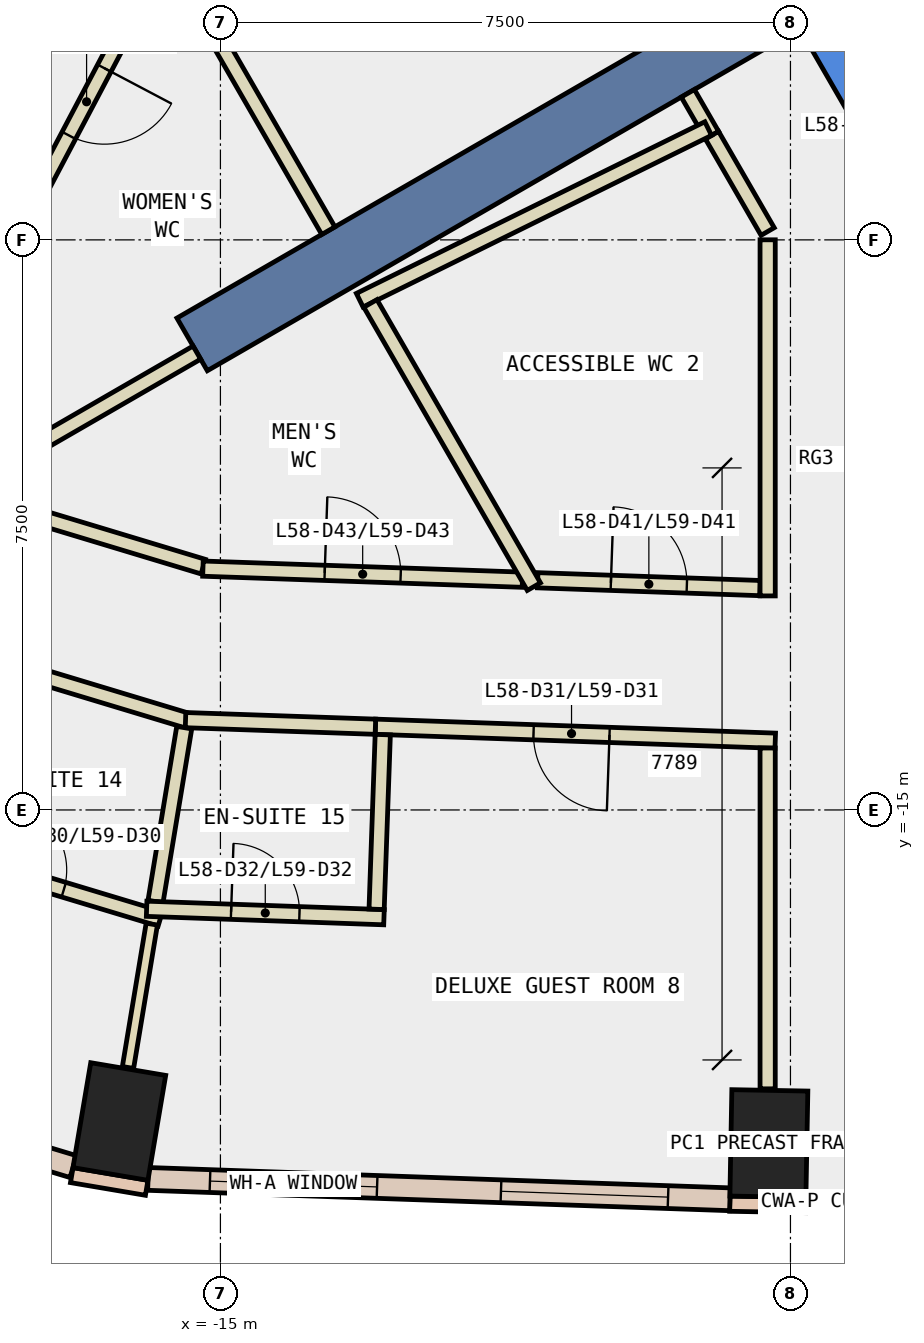
"""IFC4 building model, lengths in metres.
Left out: names, types, materials, properties, quantities, classifications, styles, units other than length and angle.
Written with IfcOpenShell. Run it as: python <this file> out.ifc"""

import sys

from ifc_helpers import new_model, si_unit, direction, frame, frame_2d, origin, origin_2d, place, context, subcontext, project, spatial, polyline, rectangle, outline, extrude, element, fill, save


model = new_model("IFC4")
c1 = context("Model", 3, precision=1e-05, world=origin(), true_north=direction((0.0, 1.0)))
c2 = subcontext(c1, "Body", "Model", "MODEL_VIEW")
j1 = project(units=[si_unit("LENGTHUNIT", "METRE"), si_unit("PLANEANGLEUNIT", "RADIAN")], contexts=[c1])
p1 = place(None, origin())
s1 = spatial("IfcSite", under=j1, at=p1, CompositionType="ELEMENT")
p2 = place(p1, origin())
s2 = spatial("IfcBuilding", under=s1, at=p2, CompositionType="ELEMENT")
p3 = place(p2, frame((0.0, 0.0, 255.8)))
s3 = spatial("IfcBuildingStorey", under=s2, at=p3, CompositionType="ELEMENT", Elevation=255.8)
for number, where, z_axis, x_axis in (
    (1, (-16.33, -19.099, -0.34), (0.0, 0.0, 1.0), (-0.986, 0.167, 0.0)),
    (2, (-7.784, -19.389, -0.34), (0.0, 0.0, 1.0), (-1.0, 0.018, 0.0)),
):
    element("IfcColumn", number, at=place(p3, frame(where, z_axis=z_axis, x_axis=x_axis)), inside=s3, PredefinedType="COLUMN", context=c2, shape_type="SweptSolid", body=[
        extrude(rectangle(XDim=1.0, YDim=1.4, at=origin_2d()), origin(), (0.0, 0.0, 1.0), 3.6),
    ])
p4 = place(p3, frame((0.0, 0.0, -0.34)))
e3 = element("IfcWall", 3, at=p4, inside=s3, PredefinedType="SHEAR", context=c2, shape_type="SweptSolid", body=[
    extrude(outline(polyline([(-11.547, 2.5), (-5.774, -7.5), (-5.427, -6.9), (-10.854, 2.5), (-11.547, 2.5)])), origin(), (0.0, 0.0, 1.0), 3.6),
])
p5 = place(p3, frame((-7.578, -4.375, -0.34), z_axis=(0.0, 0.0, 1.0), x_axis=(-0.866024315419, -0.5000018851, 0.0)))
e4 = element("IfcWall", 4, at=p5, inside=s3, PredefinedType="SHEAR", context=c2, shape_type="SweptSolid", body=[
    extrude(rectangle(XDim=9.0, YDim=0.8, at=frame_2d((4.5, 0.0))), origin(), (0.0, 0.0, 1.0), 3.6),
])
for number, where, z_axis, x_axis in (
    (5, (-16.956, -19.804, 0.0), (0.0, 0.0, 1.0), (0.986, -0.167, 0.0)),
    (6, (-8.298, -20.18, 0.0), (0.0, 0.0, 1.0), (1.0, -0.018, 0.0)),
):
    element("IfcWall", number, at=place(p3, frame(where, z_axis=z_axis, x_axis=x_axis)), inside=s3, PredefinedType="STANDARD", context=c2, shape_type="SweptSolid", body=[
        extrude(rectangle(XDim=1.0, YDim=0.2, at=frame_2d((0.5, 0.0))), origin(), (0.0, 0.0, 1.0), 3.26),
    ])
p6 = place(p3, frame((-15.952, -19.854, 0.0), z_axis=(0.0, 0.0, 1.0), x_axis=(0.999387577449, -0.034992428331, 0.0)))
e7 = element("IfcWall", 7, at=p6, inside=s3, PredefinedType="STANDARD", context=c2, shape_type="SweptSolid", body=[
    extrude(rectangle(XDim=7.661, YDim=0.3, at=frame_2d((3.83, 0.0))), origin(), (0.0, 0.0, 1.0), 3.26),
])
p7 = place(p6, frame((0.815, 0.0, 0.9)))
e8 = element("IfcOpeningElement", 8, at=p7, cuts=e7, PredefinedType="OPENING", context=c2, shape_type="SweptSolid", body=[
    extrude(rectangle(XDim=2.2, YDim=2.0, at=frame_2d((1.1, 1.0))), frame((0.0, 0.16, 0.0), z_axis=(0.0, -1.0, 0.0), x_axis=(1.0, 0.0, 0.0)), (0.0, 0.0, 1.0), 0.32),
])
p8 = place(p6, frame((4.646, 0.0, 0.9)))
e9 = element("IfcOpeningElement", 9, at=p8, cuts=e7, PredefinedType="OPENING", context=c2, shape_type="SweptSolid", body=[
    extrude(rectangle(XDim=2.2, YDim=2.0, at=frame_2d((1.1, 1.0))), frame((0.0, 0.16, 0.0), z_axis=(0.0, -1.0, 0.0), x_axis=(1.0, 0.0, 0.0)), (0.0, 0.0, 1.0), 0.32),
])
p9 = place(p3, frame((-21.034, -18.455, 0.0), z_axis=(0.0, 0.0, 1.0), x_axis=(0.957346168713, -0.288943442997, 0.0)))
e10 = element("IfcWall", 10, at=p9, inside=s3, PredefinedType="STANDARD", context=c2, shape_type="SweptSolid", body=[
    extrude(rectangle(XDim=4.281, YDim=0.3, at=frame_2d((2.14, 0.0))), origin(), (0.0, 0.0, 1.0), 3.26),
])
p10 = place(p9, frame((1.44, 0.0, 0.9)))
e11 = element("IfcOpeningElement", 11, at=p10, cuts=e10, PredefinedType="OPENING", context=c2, shape_type="SweptSolid", body=[
    extrude(rectangle(XDim=1.4, YDim=2.0, at=frame_2d((0.7, 1.0))), frame((0.0, 0.16, 0.0), z_axis=(0.0, -1.0, 0.0), x_axis=(1.0, 0.0, 0.0)), (0.0, 0.0, 1.0), 0.32),
])
p11 = place(p3, frame((-8.532, -6.123, 0.0), z_axis=(0.0, 0.0, 1.0), x_axis=(-0.499977104415, 0.866038622153, 0.0)))
e12 = element("IfcWall", 12, at=p11, inside=s3, PredefinedType="PARTITIONING", context=c2, shape_type="SweptSolid", body=[
    extrude(rectangle(XDim=0.636, YDim=0.2, at=frame_2d((0.318, 0.0))), origin(), (0.0, 0.0, 1.0), 3.26),
])
p12 = place(p3, frame((-7.8, -7.39, 0.0), z_axis=(0.0, 0.0, 1.0), x_axis=(-0.500266477503, 0.865871498253, 0.0)))
e13 = element("IfcWall", 13, at=p12, inside=s3, PredefinedType="PARTITIONING", context=c2, shape_type="SweptSolid", body=[
    extrude(rectangle(XDim=1.463, YDim=0.2, at=frame_2d((0.731, 0.0))), origin(), (0.0, 0.0, 1.0), 3.26),
])
p13 = place(p3, frame((-10.826, -11.978, 0.0), z_axis=(0.0, 0.0, 1.0), x_axis=(0.999380679818, -0.035188873332, 0.0)))
e14 = element("IfcWall", 14, at=p13, inside=s3, PredefinedType="PARTITIONING", context=c2, shape_type="SweptSolid", body=[
    extrude(rectangle(XDim=2.928, YDim=0.2, at=frame_2d((1.464, 0.0))), origin(), (0.0, 0.0, 1.0), 3.26),
])
p14 = place(p13, frame((0.964, 0.0, 0.0)))
e15 = element("IfcOpeningElement", 15, at=p14, cuts=e14, PredefinedType="OPENING", context=c2, shape_type="SweptSolid", body=[
    extrude(rectangle(XDim=1.0, YDim=2.1, at=frame_2d((0.5, 1.05))), frame((0.0, 0.11, 0.0), z_axis=(0.0, -1.0, 0.0), x_axis=(1.0, 0.0, 0.0)), (0.0, 0.0, 1.0), 0.22),
])
p15 = place(p3, frame((-15.756, -3.779, 0.0), z_axis=(0.0, 0.0, 1.0), x_axis=(-0.46672043873, -0.884404902786, 0.0)))
e16 = element("IfcWall", 16, at=p15, inside=s3, PredefinedType="PARTITIONING", context=c2, shape_type="SweptSolid", body=[
    extrude(rectangle(XDim=4.307, YDim=0.2, at=frame_2d((2.153, 0.0))), origin(), (0.0, 0.0, 1.0), 3.26),
])
p16 = place(p15, frame((1.653, 0.0, 0.0)))
e17 = element("IfcOpeningElement", 17, at=p16, cuts=e16, PredefinedType="OPENING", context=c2, shape_type="SweptSolid", body=[
    extrude(rectangle(XDim=1.0, YDim=2.1, at=frame_2d((0.5, 1.05))), frame((0.0, 0.11, 0.0), z_axis=(0.0, -1.0, 0.0), x_axis=(1.0, 0.0, 0.0)), (0.0, 0.0, 1.0), 0.22),
])
p17 = place(p3, frame((-17.386, -11.147, 0.0), z_axis=(0.0, 0.0, 1.0), x_axis=(0.957321496956, -0.289025174451, 0.0)))
e18 = element("IfcWall", 18, at=p17, inside=s3, PredefinedType="PARTITIONING", context=c2, shape_type="SweptSolid", body=[
    extrude(rectangle(XDim=2.256, YDim=0.2, at=frame_2d((1.128, 0.0))), origin(), (0.0, 0.0, 1.0), 3.26),
])
p18 = place(p3, frame((-15.23, -11.825, 0.0), z_axis=(0.0, 0.0, 1.0), x_axis=(0.999397560436, -0.0347061406, 0.0)))
e19 = element("IfcWall", 19, at=p18, inside=s3, PredefinedType="PARTITIONING", context=c2, shape_type="SweptSolid", body=[
    extrude(rectangle(XDim=4.207, YDim=0.2, at=frame_2d((2.103, 0.0))), origin(), (0.0, 0.0, 1.0), 3.26),
])
p19 = place(p18, frame((1.603, 0.0, 0.0)))
e20 = element("IfcOpeningElement", 20, at=p19, cuts=e19, PredefinedType="OPENING", context=c2, shape_type="SweptSolid", body=[
    extrude(rectangle(XDim=1.0, YDim=2.1, at=frame_2d((0.5, 1.05))), frame((0.0, 0.11, 0.0), z_axis=(0.0, -1.0, 0.0), x_axis=(1.0, 0.0, 0.0)), (0.0, 0.0, 1.0), 0.22),
])
p20 = place(p3, frame((-15.363, -13.847, 0.0), z_axis=(0.0, 0.0, 1.0), x_axis=(-0.957320969561, 0.289026921303, 0.0)))
e21 = element("IfcWall", 21, at=p20, inside=s3, PredefinedType="PARTITIONING", context=c2, shape_type="SweptSolid", body=[
    extrude(rectangle(XDim=3.214, YDim=0.2, at=frame_2d((1.607, 0.0))), origin(), (0.0, 0.0, 1.0), 3.26),
])
p21 = place(p3, frame((-7.7, -14.089, 0.0), z_axis=(0.0, 0.0, 1.0), x_axis=(-0.999388410674, 0.034968623214, 0.0)))
e22 = element("IfcWall", 22, at=p21, inside=s3, PredefinedType="PARTITIONING", context=c2, shape_type="SweptSolid", body=[
    extrude(rectangle(XDim=5.264, YDim=0.2, at=frame_2d((2.632, 0.0))), origin(), (0.0, 0.0, 1.0), 3.26),
])
p22 = place(p21, frame((2.182, 0.0, 0.0)))
e23 = element("IfcOpeningElement", 23, at=p22, cuts=e22, PredefinedType="OPENING", context=c2, shape_type="SweptSolid", body=[
    extrude(rectangle(XDim=1.0, YDim=2.1, at=frame_2d((0.5, 1.05))), frame((0.0, 0.11, 0.0), z_axis=(0.0, -1.0, 0.0), x_axis=(1.0, 0.0, 0.0)), (0.0, 0.0, 1.0), 0.22),
])
p23 = place(p3, frame((-12.961, -13.905, 0.0), z_axis=(0.0, 0.0, 1.0), x_axis=(-0.999395279268, 0.034771766949, 0.0)))
e24 = element("IfcWall", 24, at=p23, inside=s3, PredefinedType="PARTITIONING", context=c2, shape_type="SweptSolid", body=[
    extrude(rectangle(XDim=2.5, YDim=0.2, at=frame_2d((1.25, 0.0))), origin(), (0.0, 0.0, 1.0), 3.26),
])
p24 = place(p3, frame((-7.8, -12.184, 0.0), z_axis=(0.0, 0.0, 1.0), x_axis=(0.0, 1.0, 0.0)))
e25 = element("IfcWall", 25, at=p24, inside=s3, PredefinedType="PARTITIONING", context=c2, shape_type="SweptSolid", body=[
    extrude(rectangle(XDim=4.685, YDim=0.2, at=frame_2d((2.343, 0.0))), origin(), (0.0, 0.0, 1.0), 3.26),
])
p25 = place(p3, frame((-7.8, -18.669, 0.0), z_axis=(0.0, 0.0, 1.0), x_axis=(0.0, 1.0, 0.0)))
e26 = element("IfcWall", 26, at=p25, inside=s3, PredefinedType="PARTITIONING", context=c2, shape_type="SweptSolid", body=[
    extrude(rectangle(XDim=4.484, YDim=0.2, at=frame_2d((2.242, 0.0))), origin(), (0.0, 0.0, 1.0), 3.26),
])
p26 = place(p3, frame((-8.582, -6.036, 0.0), z_axis=(0.0, 0.0, 1.0), x_axis=(-0.897105141673, -0.441817116897, 0.0)))
e27 = element("IfcWall", 27, at=p26, inside=s3, PredefinedType="PARTITIONING", context=c2, shape_type="SweptSolid", body=[
    extrude(rectangle(XDim=5.111, YDim=0.2, at=frame_2d((2.555, 0.0))), origin(), (0.0, 0.0, 1.0), 3.26),
])
p27 = place(p3, frame((-13.58, -7.379, 0.0), z_axis=(0.0, 0.0, 1.0), x_axis=(-0.499916403993, 0.866073662582, 0.0)))
e28 = element("IfcWall", 28, at=p27, inside=s3, PredefinedType="PARTITIONING", context=c2, shape_type="SweptSolid", body=[
    extrude(rectangle(XDim=4.359, YDim=0.2, at=frame_2d((2.179, 0.0))), origin(), (0.0, 0.0, 1.0), 3.26),
])
p28 = place(p3, frame((-10.876, -12.062, 0.0), z_axis=(0.0, 0.0, 1.0), x_axis=(-0.499977877545, 0.866038175813, 0.0)))
e29 = element("IfcWall", 29, at=p28, inside=s3, PredefinedType="PARTITIONING", context=c2, shape_type="SweptSolid", body=[
    extrude(rectangle(XDim=4.302, YDim=0.2, at=frame_2d((2.151, 0.0))), origin(), (0.0, 0.0, 1.0), 3.26),
])
p29 = place(p3, frame((-15.31, -8.983, 0.0), z_axis=(0.0, 0.0, 1.0), x_axis=(-0.866047943894, -0.499960957353, 0.0)))
e30 = element("IfcWall", 30, at=p29, inside=s3, PredefinedType="PARTITIONING", context=c2, shape_type="SweptSolid", body=[
    extrude(rectangle(XDim=3.16, YDim=0.2, at=frame_2d((1.58, 0.0))), origin(), (0.0, 0.0, 1.0), 3.26),
])
p30 = place(p3, frame((-19.191, -15.407, 0.0), z_axis=(0.0, 0.0, 1.0), x_axis=(0.957443200759, -0.28862175476, 0.0)))
e31 = element("IfcWall", 31, at=p30, inside=s3, PredefinedType="PARTITIONING", context=c2, shape_type="SweptSolid", body=[
    extrude(rectangle(XDim=3.551, YDim=0.2, at=frame_2d((1.775, 0.0))), origin(), (0.0, 0.0, 1.0), 3.26),
])
p31 = place(p30, frame((1.325, 0.0, 0.0)))
e32 = element("IfcOpeningElement", 32, at=p31, cuts=e31, PredefinedType="OPENING", context=c2, shape_type="SweptSolid", body=[
    extrude(rectangle(XDim=0.9, YDim=2.1, at=frame_2d((0.45, 1.05))), frame((0.0, 0.11, 0.0), z_axis=(0.0, -1.0, 0.0), x_axis=(1.0, 0.0, 0.0)), (0.0, 0.0, 1.0), 0.22),
])
p32 = place(p3, frame((-15.903, -16.502, 0.0), z_axis=(0.0, 0.0, 1.0), x_axis=(-0.163715562906, -0.986507584594, 0.0)))
e33 = element("IfcWall", 33, at=p32, inside=s3, PredefinedType="PARTITIONING", context=c2, shape_type="SweptSolid", body=[
    extrude(rectangle(XDim=1.912, YDim=0.15, at=frame_2d((0.956, 0.0))), origin(), (0.0, 0.0, 1.0), 3.26),
])
p33 = place(p3, frame((-15.476, -13.917, 0.0), z_axis=(0.0, 0.0, 1.0), x_axis=(-0.162964805234, -0.986631882849, 0.0)))
e34 = element("IfcWall", 34, at=p33, inside=s3, PredefinedType="PARTITIONING", context=c2, shape_type="SweptSolid", body=[
    extrude(rectangle(XDim=2.319, YDim=0.2, at=frame_2d((1.16, 0.0))), origin(), (0.0, 0.0, 1.0), 3.26),
])
p34 = place(p3, frame((-15.971, -16.3, 0.0), z_axis=(0.0, 0.0, 1.0), x_axis=(0.999370791233, -0.035468600627, 0.0)))
e35 = element("IfcWall", 35, at=p34, inside=s3, PredefinedType="PARTITIONING", context=c2, shape_type="SweptSolid", body=[
    extrude(rectangle(XDim=3.125, YDim=0.2, at=frame_2d((1.562, 0.0))), origin(), (0.0, 0.0, 1.0), 3.26),
])
p35 = place(p34, frame((1.112, 0.0, 0.0)))
e36 = element("IfcOpeningElement", 36, at=p35, cuts=e35, PredefinedType="OPENING", context=c2, shape_type="SweptSolid", body=[
    extrude(rectangle(XDim=0.9, YDim=2.1, at=frame_2d((0.45, 1.05))), frame((0.0, 0.11, 0.0), z_axis=(0.0, -1.0, 0.0), x_axis=(1.0, 0.0, 0.0)), (0.0, 0.0, 1.0), 0.22),
])
p36 = place(p3, frame((-12.945, -16.307, 0.0), z_axis=(0.0, 0.0, 1.0), x_axis=(0.035252193458, 0.999378448265, 0.0)))
e37 = element("IfcWall", 37, at=p36, inside=s3, PredefinedType="PARTITIONING", context=c2, shape_type="SweptSolid", body=[
    extrude(rectangle(XDim=2.299, YDim=0.2, at=frame_2d((1.15, 0.0))), origin(), (0.0, 0.0, 1.0), 3.26),
])
p37 = place(p7, origin())
e38 = element("IfcWindow", 38, at=p37, inside=s3, PartitioningType="SINGLE_PANEL", PredefinedType="WINDOW", context=c2, shape_type="SweptSolid", body=[
    extrude(rectangle(XDim=2.2, YDim=2.0, at=frame_2d((1.1, 1.0))), frame((0.0, 0.03, 0.0), z_axis=(0.0, -1.0, 0.0), x_axis=(1.0, 0.0, 0.0)), (0.0, 0.0, 1.0), 0.06),
])
fill(e8, e38)
p38 = place(p8, origin())
e39 = element("IfcWindow", 39, at=p38, inside=s3, PartitioningType="SINGLE_PANEL", PredefinedType="WINDOW", context=c2, shape_type="SweptSolid", body=[
    extrude(rectangle(XDim=2.2, YDim=2.0, at=frame_2d((1.1, 1.0))), frame((0.0, 0.03, 0.0), z_axis=(0.0, -1.0, 0.0), x_axis=(1.0, 0.0, 0.0)), (0.0, 0.0, 1.0), 0.06),
])
fill(e9, e39)
p39 = place(p31, origin())
e40 = element("IfcDoor", 40, at=p39, inside=s3, OperationType="SINGLE_SWING_LEFT", PredefinedType="DOOR", context=c2, shape_type="SweptSolid", body=[
    extrude(rectangle(XDim=0.9, YDim=2.1, at=frame_2d((0.45, 1.05))), frame((0.0, 0.025, 0.0), z_axis=(0.0, -1.0, 0.0), x_axis=(1.0, 0.0, 0.0)), (0.0, 0.0, 1.0), 0.05),
])
fill(e32, e40)
p40 = place(p22, origin())
e41 = element("IfcDoor", 41, at=p40, inside=s3, OperationType="SINGLE_SWING_LEFT", PredefinedType="DOOR", context=c2, shape_type="SweptSolid", body=[
    extrude(rectangle(XDim=1.0, YDim=2.1, at=frame_2d((0.5, 1.05))), frame((0.0, 0.025, 0.0), z_axis=(0.0, -1.0, 0.0), x_axis=(1.0, 0.0, 0.0)), (0.0, 0.0, 1.0), 0.05),
])
fill(e23, e41)
p41 = place(p35, origin())
e42 = element("IfcDoor", 42, at=p41, inside=s3, OperationType="SINGLE_SWING_LEFT", PredefinedType="DOOR", context=c2, shape_type="SweptSolid", body=[
    extrude(rectangle(XDim=0.9, YDim=2.1, at=frame_2d((0.45, 1.05))), frame((0.0, 0.025, 0.0), z_axis=(0.0, -1.0, 0.0), x_axis=(1.0, 0.0, 0.0)), (0.0, 0.0, 1.0), 0.05),
])
fill(e36, e42)
p42 = place(p14, origin())
e43 = element("IfcDoor", 43, at=p42, inside=s3, OperationType="SINGLE_SWING_LEFT", PredefinedType="DOOR", context=c2, shape_type="SweptSolid", body=[
    extrude(rectangle(XDim=1.0, YDim=2.1, at=frame_2d((0.5, 1.05))), frame((0.0, 0.025, 0.0), z_axis=(0.0, -1.0, 0.0), x_axis=(1.0, 0.0, 0.0)), (0.0, 0.0, 1.0), 0.05),
])
fill(e15, e43)
p43 = place(p16, origin())
e44 = element("IfcDoor", 44, at=p43, inside=s3, OperationType="SINGLE_SWING_LEFT", PredefinedType="DOOR", context=c2, shape_type="SweptSolid", body=[
    extrude(rectangle(XDim=1.0, YDim=2.1, at=frame_2d((0.5, 1.05))), frame((0.0, 0.025, 0.0), z_axis=(0.0, -1.0, 0.0), x_axis=(1.0, 0.0, 0.0)), (0.0, 0.0, 1.0), 0.05),
])
fill(e17, e44)
p44 = place(p19, origin())
e45 = element("IfcDoor", 45, at=p44, inside=s3, OperationType="SINGLE_SWING_LEFT", PredefinedType="DOOR", context=c2, shape_type="SweptSolid", body=[
    extrude(rectangle(XDim=1.0, YDim=2.1, at=frame_2d((0.5, 1.05))), frame((0.0, 0.025, 0.0), z_axis=(0.0, -1.0, 0.0), x_axis=(1.0, 0.0, 0.0)), (0.0, 0.0, 1.0), 0.05),
])
fill(e20, e45)
save(model, sys.argv[1])
